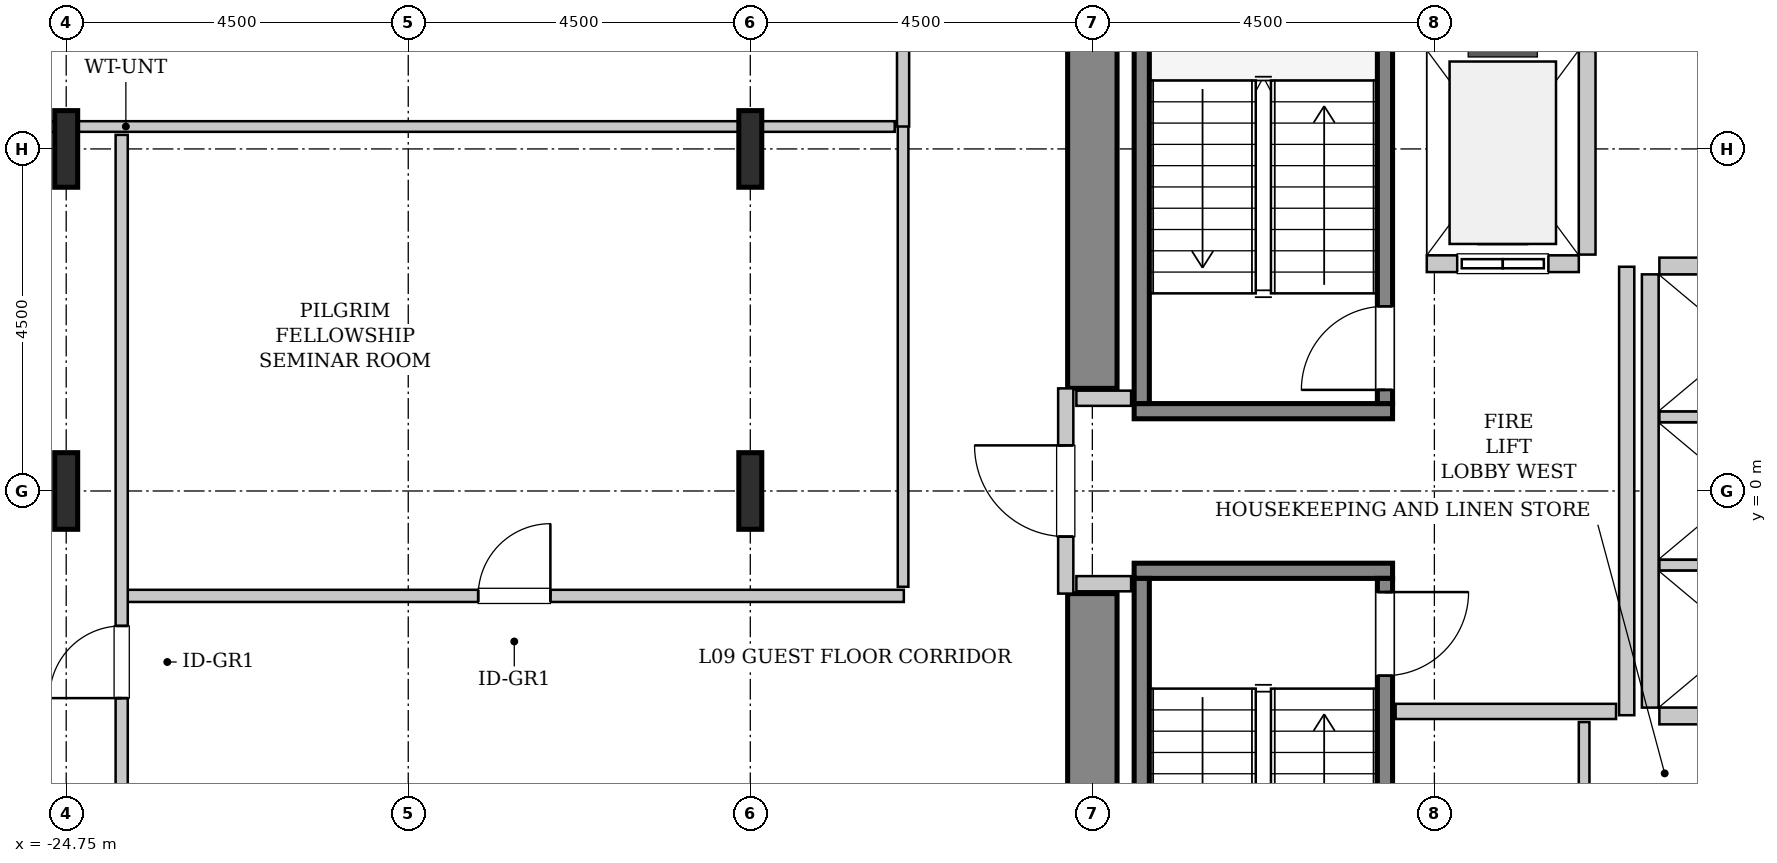
"""IFC4 building model, lengths in metres.
Left out: names, types, materials, properties, quantities, classifications, styles, units other than length and angle.
Written with IfcOpenShell. Run it as: python <this file> out.ifc"""

import sys

from ifc_helpers import new_model, si_unit, direction, frame, frame_2d, origin, origin_2d, place, context, subcontext, project, spatial, rectangle, i_section, extrude, source, transform, mapped, element, fill, save


model = new_model("IFC4")
c1 = context("Model", 3, precision=1e-05, world=origin(), true_north=direction((0.0, 1.0)))
c2 = subcontext(c1, "Body", "Model", "MODEL_VIEW")
j1 = project(units=[si_unit("LENGTHUNIT", "METRE"), si_unit("PLANEANGLEUNIT", "RADIAN")], contexts=[c1])
p1 = place(None, origin())
s1 = spatial("IfcSite", under=j1, at=p1, CompositionType="ELEMENT")
p2 = place(p1, origin())
s2 = spatial("IfcBuilding", under=s1, at=p2, CompositionType="ELEMENT")
p3 = place(p2, frame((0.0, 0.0, 44.4)))
s3 = spatial("IfcBuildingStorey", under=s2, at=p3, CompositionType="ELEMENT", Elevation=44.4)
m1 = source(origin(), c2, "Body", "SweptSolid", [
    extrude(rectangle(XDim=7.325, YDim=0.65, at=frame_2d((3.663, 0.0))), origin(), (0.0, 0.0, 1.0), 3.8),
])
for number, where, z_axis, x_axis in (
    (1, (-11.25, -8.675, 0.0), (0.0, 0.0, 1.0), (0.0, 1.0, 0.0)),
    (2, (-11.25, 1.35, 0.0), (0.0, 0.0, 1.0), (0.0, 1.0, 0.0)),
):
    element("IfcWall", number, at=place(p3, frame(where, z_axis=z_axis, x_axis=x_axis)), inside=s3, PredefinedType="SHEAR", context=c2, shape_type="MappedRepresentation", body=[
        mapped(m1, transform((0.0, 0.0, 0.0), x_axis=(1.0, 0.0, 0.0), y_axis=(0.0, 1.0, 0.0), z_axis=(0.0, 0.0, 1.0), scale=1.0)),
    ])
m2 = source(origin(), c2, "Body", "SweptSolid", [
    extrude(i_section(OverallWidth=0.302, OverallDepth=1.008, WebThickness=0.021, FlangeThickness=0.04, FilletRadius=0.03, at=origin_2d()), origin(), (0.0, 0.0, 1.0), 3.8),
])
for number, where, z_axis, x_axis in (
    (3, (-24.75, 0.0, 0.0), (0.0, 0.0, 1.0), (1.0, 0.0, 0.0)),
    (4, (-24.75, 4.5, 0.0), (0.0, 0.0, 1.0), (1.0, 0.0, 0.0)),
    (5, (-15.75, 0.0, 0.0), (0.0, 0.0, 1.0), (1.0, 0.0, 0.0)),
    (6, (-15.75, 4.5, 0.0), (0.0, 0.0, 1.0), (1.0, 0.0, 0.0)),
):
    element("IfcColumn", number, at=place(p3, frame(where, z_axis=z_axis, x_axis=x_axis)), inside=s3, PredefinedType="COLUMN", context=c2, shape_type="MappedRepresentation", body=[
        mapped(m2, transform((0.0, 0.0, 0.0), x_axis=(1.0, 0.0, 0.0), y_axis=(0.0, 1.0, 0.0), z_axis=(0.0, 0.0, 1.0), scale=1.0)),
    ])
m3 = source(origin(), c2, "Body", "SweptSolid", [
    extrude(rectangle(XDim=3.4, YDim=0.2, at=frame_2d((1.7, 0.0))), origin(), (0.0, 0.0, 1.0), 3.8),
])
p4 = place(p3, frame((-7.3, 1.05, 0.0), z_axis=(0.0, 0.0, 1.0), x_axis=(-1.0, 0.0, 0.0)))
e7 = element("IfcWall", 7, at=p4, inside=s3, PredefinedType="SOLIDWALL", context=c2, shape_type="MappedRepresentation", body=[
    mapped(m3, transform((0.0, 0.0, 0.0), x_axis=(1.0, 0.0, 0.0), y_axis=(0.0, 1.0, 0.0), z_axis=(0.0, 0.0, 1.0), scale=1.0)),
])
m4 = source(origin(), c2, "Body", "SweptSolid", [
    extrude(rectangle(XDim=7.1, YDim=0.2, at=frame_2d((3.55, 0.0))), origin(), (0.0, 0.0, 1.0), 3.8),
])
p5 = place(p3, frame((-7.4, 1.15, 0.0), z_axis=(0.0, 0.0, 1.0), x_axis=(0.0, 1.0, 0.0)))
e8 = element("IfcWall", 8, at=p5, inside=s3, PredefinedType="SOLIDWALL", context=c2, shape_type="MappedRepresentation", body=[
    mapped(m4, transform((0.0, 0.0, 0.0), x_axis=(1.0, 0.0, 0.0), y_axis=(0.0, 1.0, 0.0), z_axis=(0.0, 0.0, 1.0), scale=1.0)),
])
p6 = place(p5, frame((0.18, 0.0, 0.0)))
e9 = element("IfcOpeningElement", 9, at=p6, cuts=e8, PredefinedType="OPENING", context=c2, shape_type="SweptSolid", body=[
    extrude(rectangle(XDim=1.1, YDim=2.15, at=frame_2d((0.55, 1.075))), frame((0.0, 0.11, 0.0), z_axis=(0.0, -1.0, 0.0), x_axis=(1.0, 0.0, 0.0)), (0.0, 0.0, 1.0), 0.22),
])
p7 = place(p3, frame((-10.6, 1.15, 0.0), z_axis=(0.0, 0.0, 1.0), x_axis=(0.0, 1.0, 0.0)))
e10 = element("IfcWall", 10, at=p7, inside=s3, PredefinedType="SOLIDWALL", context=c2, shape_type="MappedRepresentation", body=[
    mapped(m4, transform((0.0, 0.0, 0.0), x_axis=(1.0, 0.0, 0.0), y_axis=(0.0, 1.0, 0.0), z_axis=(0.0, 0.0, 1.0), scale=1.0)),
])
p8 = place(p3, frame((-10.7, -1.05, 0.0), z_axis=(0.0, 0.0, 1.0), x_axis=(1.0, 0.0, 0.0)))
e11 = element("IfcWall", 11, at=p8, inside=s3, PredefinedType="SOLIDWALL", context=c2, shape_type="MappedRepresentation", body=[
    mapped(m3, transform((0.0, 0.0, 0.0), x_axis=(1.0, 0.0, 0.0), y_axis=(0.0, 1.0, 0.0), z_axis=(0.0, 0.0, 1.0), scale=1.0)),
])
p9 = place(p3, frame((-10.6, -1.15, 0.0), z_axis=(0.0, 0.0, 1.0), x_axis=(0.0, -1.0, 0.0)))
e12 = element("IfcWall", 12, at=p9, inside=s3, PredefinedType="SOLIDWALL", context=c2, shape_type="MappedRepresentation", body=[
    mapped(m4, transform((0.0, 0.0, 0.0), x_axis=(1.0, 0.0, 0.0), y_axis=(0.0, 1.0, 0.0), z_axis=(0.0, 0.0, 1.0), scale=1.0)),
])
p10 = place(p3, frame((-7.4, -1.15, 0.0), z_axis=(0.0, 0.0, 1.0), x_axis=(0.0, -1.0, 0.0)))
e13 = element("IfcWall", 13, at=p10, inside=s3, PredefinedType="SOLIDWALL", context=c2, shape_type="MappedRepresentation", body=[
    mapped(m4, transform((0.0, 0.0, 0.0), x_axis=(1.0, 0.0, 0.0), y_axis=(0.0, 1.0, 0.0), z_axis=(0.0, 0.0, 1.0), scale=1.0)),
])
p11 = place(p10, frame((0.18, 0.0, 0.0)))
e14 = element("IfcOpeningElement", 14, at=p11, cuts=e13, PredefinedType="OPENING", context=c2, shape_type="SweptSolid", body=[
    extrude(rectangle(XDim=1.1, YDim=2.15, at=frame_2d((0.55, 1.075))), frame((0.0, 0.11, 0.0), z_axis=(0.0, -1.0, 0.0), x_axis=(1.0, 0.0, 0.0)), (0.0, 0.0, 1.0), 0.22),
])
m5 = source(origin(), c2, "Body", "SweptSolid", [
    extrude(rectangle(XDim=2.0, YDim=0.22, at=frame_2d((1.0, 0.0))), origin(), (0.0, 0.0, 1.0), 3.535),
])
p12 = place(p3, frame((-6.85, 2.99, 0.0), z_axis=(0.0, 0.0, 1.0), x_axis=(1.0, 0.0, 0.0)))
e15 = element("IfcWall", 15, at=p12, inside=s3, PredefinedType="SOLIDWALL", context=c2, shape_type="MappedRepresentation", body=[
    mapped(m5, transform((0.0, 0.0, 0.0), x_axis=(1.0, 0.0, 0.0), y_axis=(0.0, 1.0, 0.0), z_axis=(0.0, 0.0, 1.0), scale=1.0)),
])
p13 = place(p12, frame((0.4, 0.0, 0.0)))
e16 = element("IfcOpeningElement", 16, at=p13, cuts=e15, PredefinedType="OPENING", context=c2, shape_type="SweptSolid", body=[
    extrude(rectangle(XDim=1.2, YDim=2.2, at=frame_2d((0.6, 1.1))), frame((0.0, 0.12, 0.0), z_axis=(0.0, -1.0, 0.0), x_axis=(1.0, 0.0, 0.0)), (0.0, 0.0, 1.0), 0.24),
])
m6 = source(origin(), c2, "Body", "SweptSolid", [
    extrude(rectangle(XDim=2.68, YDim=0.22, at=frame_2d((1.34, 0.0))), origin(), (0.0, 0.0, 1.0), 3.535),
])
p14 = place(p3, frame((-4.74, 3.11, 0.0), z_axis=(0.0, 0.0, 1.0), x_axis=(0.0, 1.0, 0.0)))
e17 = element("IfcWall", 17, at=p14, inside=s3, PredefinedType="SOLIDWALL", context=c2, shape_type="MappedRepresentation", body=[
    mapped(m6, transform((0.0, 0.0, 0.0), x_axis=(1.0, 0.0, 0.0), y_axis=(0.0, 1.0, 0.0), z_axis=(0.0, 0.0, 1.0), scale=1.0)),
])
m7 = source(origin(), c2, "Body", "SweptSolid", [
    extrude(rectangle(XDim=5.7, YDim=0.22, at=frame_2d((2.85, 0.0))), origin(), (0.0, 0.0, 1.0), 3.535),
])
p15 = place(p3, frame((-3.91, 2.85, 0.0), z_axis=(0.0, 0.0, 1.0), x_axis=(0.0, -1.0, 0.0)))
e18 = element("IfcWall", 18, at=p15, inside=s3, PredefinedType="SOLIDWALL", context=c2, shape_type="MappedRepresentation", body=[
    mapped(m7, transform((0.0, 0.0, 0.0), x_axis=(1.0, 0.0, 0.0), y_axis=(0.0, 1.0, 0.0), z_axis=(0.0, 0.0, 1.0), scale=1.0)),
])
m8 = source(origin(), c2, "Body", "SweptSolid", [
    extrude(rectangle(XDim=2.13, YDim=0.22, at=frame_2d((1.065, 0.0))), origin(), (0.0, 0.0, 1.0), 3.535),
])
p16 = place(p3, frame((-3.79, -2.96, 0.0), z_axis=(0.0, 0.0, 1.0), x_axis=(1.0, 0.0, 0.0)))
e19 = element("IfcWall", 19, at=p16, inside=s3, PredefinedType="SOLIDWALL", context=c2, shape_type="MappedRepresentation", body=[
    mapped(m8, transform((0.0, 0.0, 0.0), x_axis=(1.0, 0.0, 0.0), y_axis=(0.0, 1.0, 0.0), z_axis=(0.0, 0.0, 1.0), scale=1.0)),
])
m9 = source(origin(), c2, "Body", "SweptSolid", [
    extrude(rectangle(XDim=2.13, YDim=0.14, at=frame_2d((1.065, 0.0))), origin(), (0.0, 0.0, 1.0), 3.535),
])
for number, where, z_axis, x_axis in (
    (20, (-3.79, -0.975, 0.0), (0.0, 0.0, 1.0), (1.0, 0.0, 0.0)),
    (21, (-3.79, 0.975, 0.0), (0.0, 0.0, 1.0), (1.0, 0.0, 0.0)),
):
    element("IfcWall", number, at=place(p3, frame(where, z_axis=z_axis, x_axis=x_axis)), inside=s3, PredefinedType="PARTITIONING", context=c2, shape_type="MappedRepresentation", body=[
        mapped(m9, transform((0.0, 0.0, 0.0), x_axis=(1.0, 0.0, 0.0), y_axis=(0.0, 1.0, 0.0), z_axis=(0.0, 0.0, 1.0), scale=1.0)),
    ])
p17 = place(p3, frame((-1.66, 2.96, 0.0), z_axis=(0.0, 0.0, 1.0), x_axis=(-1.0, 0.0, 0.0)))
e22 = element("IfcWall", 22, at=p17, inside=s3, PredefinedType="SOLIDWALL", context=c2, shape_type="MappedRepresentation", body=[
    mapped(m8, transform((0.0, 0.0, 0.0), x_axis=(1.0, 0.0, 0.0), y_axis=(0.0, 1.0, 0.0), z_axis=(0.0, 0.0, 1.0), scale=1.0)),
])
m10 = source(origin(), c2, "Body", "SweptSolid", [
    extrude(rectangle(XDim=2.7, YDim=0.2, at=frame_2d((1.35, 0.0))), origin(), (0.0, 0.0, 1.0), 2.425),
])
p18 = place(p3, frame((-11.6, -1.35, 0.0), z_axis=(0.0, 0.0, 1.0), x_axis=(0.0, 1.0, 0.0)))
e23 = element("IfcWall", 23, at=p18, inside=s3, PredefinedType="PARTITIONING", context=c2, shape_type="MappedRepresentation", body=[
    mapped(m10, transform((0.0, 0.0, 0.0), x_axis=(1.0, 0.0, 0.0), y_axis=(0.0, 1.0, 0.0), z_axis=(0.0, 0.0, 1.0), scale=1.0)),
])
p19 = place(p18, frame((0.75, 0.0, 0.0)))
e24 = element("IfcOpeningElement", 24, at=p19, cuts=e23, PredefinedType="OPENING", context=c2, shape_type="SweptSolid", body=[
    extrude(rectangle(XDim=1.2, YDim=2.15, at=frame_2d((0.6, 1.075))), frame((0.0, 0.11, 0.0), z_axis=(0.0, -1.0, 0.0), x_axis=(1.0, 0.0, 0.0)), (0.0, 0.0, 1.0), 0.22),
])
m11 = source(origin(), c2, "Body", "SweptSolid", [
    extrude(rectangle(XDim=5.9, YDim=0.2, at=frame_2d((2.95, 0.0))), origin(), (0.0, 0.0, 1.0), 3.535),
])
p20 = place(p3, frame((-4.22, -2.95, 0.0), z_axis=(0.0, 0.0, 1.0), x_axis=(0.0, 1.0, 0.0)))
e25 = element("IfcWall", 25, at=p20, inside=s3, PredefinedType="PARTITIONING", context=c2, shape_type="MappedRepresentation", body=[
    mapped(m11, transform((0.0, 0.0, 0.0), x_axis=(1.0, 0.0, 0.0), y_axis=(0.0, 1.0, 0.0), z_axis=(0.0, 0.0, 1.0), scale=1.0)),
])
m12 = source(origin(), c2, "Body", "SweptSolid", [
    extrude(rectangle(XDim=2.9, YDim=0.2, at=frame_2d((1.45, 0.0))), origin(), (0.0, 0.0, 1.0), 3.535),
])
p21 = place(p3, frame((-7.26, -2.9, 0.0), z_axis=(0.0, 0.0, 1.0), x_axis=(1.0, 0.0, 0.0)))
e26 = element("IfcWall", 26, at=p21, inside=s3, PredefinedType="PARTITIONING", context=c2, shape_type="MappedRepresentation", body=[
    mapped(m12, transform((0.0, 0.0, 0.0), x_axis=(1.0, 0.0, 0.0), y_axis=(0.0, 1.0, 0.0), z_axis=(0.0, 0.0, 1.0), scale=1.0)),
])
m13 = source(origin(), c2, "Body", "SweptSolid", [
    extrude(rectangle(XDim=0.72, YDim=0.2, at=frame_2d((0.36, 0.0))), origin(), (0.0, 0.0, 1.0), 3.535),
])
for number, where, z_axis, x_axis in (
    (27, (-11.46, 1.22, 0.0), (0.0, 0.0, 1.0), (1.0, 0.0, 0.0)),
    (28, (-11.46, -1.22, 0.0), (0.0, 0.0, 1.0), (1.0, 0.0, 0.0)),
):
    element("IfcWall", number, at=place(p3, frame(where, z_axis=z_axis, x_axis=x_axis)), inside=s3, PredefinedType="PARTITIONING", context=c2, shape_type="MappedRepresentation", body=[
        mapped(m13, transform((0.0, 0.0, 0.0), x_axis=(1.0, 0.0, 0.0), y_axis=(0.0, 1.0, 0.0), z_axis=(0.0, 0.0, 1.0), scale=1.0)),
    ])
m14 = source(origin(), c2, "Body", "SweptSolid", [
    extrude(rectangle(XDim=1.26, YDim=0.14, at=frame_2d((0.63, 0.0))), origin(), (0.0, 0.0, 1.0), 3.535),
])
p22 = place(p3, frame((-4.78, -4.3, 0.0), z_axis=(0.0, 0.0, 1.0), x_axis=(0.0, 1.0, 0.0)))
e29 = element("IfcWall", 29, at=p22, inside=s3, PredefinedType="PARTITIONING", context=c2, shape_type="MappedRepresentation", body=[
    mapped(m14, transform((0.0, 0.0, 0.0), x_axis=(1.0, 0.0, 0.0), y_axis=(0.0, 1.0, 0.0), z_axis=(0.0, 0.0, 1.0), scale=1.0)),
])
m15 = source(origin(), c2, "Body", "SweptSolid", [
    extrude(rectangle(XDim=10.25, YDim=0.16, at=frame_2d((5.125, 0.0))), origin(), (0.0, 0.0, 1.0), 3.535),
])
p23 = place(p3, frame((-23.98, -1.38, 0.0), z_axis=(0.0, 0.0, 1.0), x_axis=(1.0, 0.0, 0.0)))
e30 = element("IfcWall", 30, at=p23, inside=s3, PredefinedType="PARTITIONING", context=c2, shape_type="MappedRepresentation", body=[
    mapped(m15, transform((0.0, 0.0, 0.0), x_axis=(1.0, 0.0, 0.0), y_axis=(0.0, 1.0, 0.0), z_axis=(0.0, 0.0, 1.0), scale=1.0)),
])
p24 = place(p23, frame((4.65, 0.0, 0.0)))
e31 = element("IfcOpeningElement", 31, at=p24, cuts=e30, PredefinedType="OPENING", context=c2, shape_type="SweptSolid", body=[
    extrude(rectangle(XDim=0.95, YDim=2.1, at=frame_2d((0.475, 1.05))), frame((0.0, 0.09, 0.0), z_axis=(0.0, -1.0, 0.0), x_axis=(1.0, 0.0, 0.0)), (0.0, 0.0, 1.0), 0.18),
])
m16 = source(origin(), c2, "Body", "SweptSolid", [
    extrude(rectangle(XDim=6.065, YDim=0.14, at=frame_2d((3.032, 0.0))), origin(), (0.0, 0.0, 1.0), 3.535),
])
p25 = place(p3, frame((-13.74, -1.26, 0.0), z_axis=(0.0, 0.0, 1.0), x_axis=(0.0, 1.0, 0.0)))
e32 = element("IfcWall", 32, at=p25, inside=s3, PredefinedType="PARTITIONING", context=c2, shape_type="MappedRepresentation", body=[
    mapped(m16, transform((0.0, 0.0, 0.0), x_axis=(1.0, 0.0, 0.0), y_axis=(0.0, 1.0, 0.0), z_axis=(0.0, 0.0, 1.0), scale=1.0)),
])
m17 = source(origin(), c2, "Body", "SweptSolid", [
    extrude(rectangle(XDim=20.23, YDim=0.14, at=frame_2d((10.115, 0.0))), origin(), (0.0, 0.0, 1.0), 2.825),
])
p26 = place(p3, frame((-34.08, 4.795, 0.0), z_axis=(0.0, 0.0, 1.0), x_axis=(1.0, 0.0, 0.0)))
e33 = element("IfcWall", 33, at=p26, inside=s3, PredefinedType="PARTITIONING", context=c2, shape_type="MappedRepresentation", body=[
    mapped(m17, transform((0.0, 0.0, 0.0), x_axis=(1.0, 0.0, 0.0), y_axis=(0.0, 1.0, 0.0), z_axis=(0.0, 0.0, 1.0), scale=1.0)),
])
m18 = source(origin(), c2, "Body", "SweptSolid", [
    extrude(rectangle(XDim=9.68, YDim=0.16, at=frame_2d((4.84, 0.0))), origin(), (0.0, 0.0, 1.0), 3.535),
])
p27 = place(p3, frame((-24.02, -4.995, 0.0), z_axis=(0.0, 0.0, 1.0), x_axis=(0.0, 1.0, 0.0)))
e34 = element("IfcWall", 34, at=p27, inside=s3, PredefinedType="PARTITIONING", context=c2, shape_type="MappedRepresentation", body=[
    mapped(m18, transform((0.0, 0.0, 0.0), x_axis=(1.0, 0.0, 0.0), y_axis=(0.0, 1.0, 0.0), z_axis=(0.0, 0.0, 1.0), scale=1.0)),
])
p28 = place(p27, frame((2.27, 0.0, 0.0)))
e35 = element("IfcOpeningElement", 35, at=p28, cuts=e34, PredefinedType="OPENING", context=c2, shape_type="SweptSolid", body=[
    extrude(rectangle(XDim=0.95, YDim=2.1, at=frame_2d((0.475, 1.05))), frame((0.0, 0.09, 0.0), z_axis=(0.0, -1.0, 0.0), x_axis=(1.0, 0.0, 0.0)), (0.0, 0.0, 1.0), 0.18),
])
m19 = source(origin(), c2, "Body", "SweptSolid", [
    extrude(rectangle(XDim=3.61, YDim=0.16, at=frame_2d((1.805, 0.0))), origin(), (0.0, 0.0, 1.0), 3.535),
])
p29 = place(p3, frame((-13.74, 4.795, 0.0), z_axis=(0.0, 0.0, 1.0), x_axis=(0.0, 1.0, 0.0)))
e36 = element("IfcWall", 36, at=p29, inside=s3, PredefinedType="PARTITIONING", context=c2, shape_type="MappedRepresentation", body=[
    mapped(m19, transform((0.0, 0.0, 0.0), x_axis=(1.0, 0.0, 0.0), y_axis=(0.0, 1.0, 0.0), z_axis=(0.0, 0.0, 1.0), scale=1.0)),
])
p30 = place(p29, frame((1.33, 0.0, 0.0)))
e37 = element("IfcOpeningElement", 37, at=p30, cuts=e36, PredefinedType="OPENING", context=c2, shape_type="SweptSolid", body=[
    extrude(rectangle(XDim=0.95, YDim=2.1, at=frame_2d((0.475, 1.05))), frame((0.0, 0.09, 0.0), z_axis=(0.0, -1.0, 0.0), x_axis=(1.0, 0.0, 0.0)), (0.0, 0.0, 1.0), 0.18),
])
m20 = source(origin(), c2, "Body", "SweptSolid", [
    extrude(rectangle(XDim=1.1, YDim=2.15, at=frame_2d((0.55, 1.075))), frame((0.0, 0.025, 0.0), z_axis=(0.0, -1.0, 0.0), x_axis=(1.0, 0.0, 0.0)), (0.0, 0.0, 1.0), 0.05),
])
p31 = place(p6, origin())
e38 = element("IfcDoor", 38, at=p31, inside=s3, OperationType="SINGLE_SWING_LEFT", PredefinedType="DOOR", context=c2, shape_type="MappedRepresentation", body=[
    mapped(m20, transform((0.0, 0.0, 0.0), x_axis=(1.0, 0.0, 0.0), y_axis=(0.0, 1.0, 0.0), z_axis=(0.0, 0.0, 1.0), scale=1.0)),
])
fill(e9, e38)
p32 = place(p11, origin())
e39 = element("IfcDoor", 39, at=p32, inside=s3, OperationType="SINGLE_SWING_LEFT", PredefinedType="DOOR", context=c2, shape_type="MappedRepresentation", body=[
    mapped(m20, transform((0.0, 0.0, 0.0), x_axis=(1.0, 0.0, 0.0), y_axis=(0.0, 1.0, 0.0), z_axis=(0.0, 0.0, 1.0), scale=1.0)),
])
fill(e14, e39)
m21 = source(origin(), c2, "Body", "SweptSolid", [
    extrude(rectangle(XDim=1.2, YDim=2.2, at=frame_2d((0.6, 1.1))), frame((0.0, 0.025, 0.0), z_axis=(0.0, -1.0, 0.0), x_axis=(1.0, 0.0, 0.0)), (0.0, 0.0, 1.0), 0.05),
])
p33 = place(p13, origin())
e40 = element("IfcDoor", 40, at=p33, inside=s3, OperationType="SLIDING_TO_LEFT", PredefinedType="DOOR", context=c2, shape_type="MappedRepresentation", body=[
    mapped(m21, transform((0.0, 0.0, 0.0), x_axis=(1.0, 0.0, 0.0), y_axis=(0.0, 1.0, 0.0), z_axis=(0.0, 0.0, 1.0), scale=1.0)),
])
fill(e16, e40)
m22 = source(origin(), c2, "Body", "SweptSolid", [
    extrude(rectangle(XDim=1.2, YDim=2.15, at=frame_2d((0.6, 1.075))), frame((0.0, 0.025, 0.0), z_axis=(0.0, -1.0, 0.0), x_axis=(1.0, 0.0, 0.0)), (0.0, 0.0, 1.0), 0.05),
])
p34 = place(p19, origin())
e41 = element("IfcDoor", 41, at=p34, inside=s3, OperationType="SINGLE_SWING_RIGHT", PredefinedType="DOOR", context=c2, shape_type="MappedRepresentation", body=[
    mapped(m22, transform((0.0, 0.0, 0.0), x_axis=(1.0, 0.0, 0.0), y_axis=(0.0, 1.0, 0.0), z_axis=(0.0, 0.0, 1.0), scale=1.0)),
])
fill(e24, e41)
m23 = source(origin(), c2, "Body", "SweptSolid", [
    extrude(rectangle(XDim=0.95, YDim=2.1, at=frame_2d((0.475, 1.05))), frame((0.0, 0.025, 0.0), z_axis=(0.0, -1.0, 0.0), x_axis=(1.0, 0.0, 0.0)), (0.0, 0.0, 1.0), 0.05),
])
p35 = place(p24, origin())
e42 = element("IfcDoor", 42, at=p35, inside=s3, OperationType="SINGLE_SWING_RIGHT", PredefinedType="DOOR", context=c2, shape_type="MappedRepresentation", body=[
    mapped(m23, transform((0.0, 0.0, 0.0), x_axis=(1.0, 0.0, 0.0), y_axis=(0.0, 1.0, 0.0), z_axis=(0.0, 0.0, 1.0), scale=1.0)),
])
fill(e31, e42)
p36 = place(p28, origin())
e43 = element("IfcDoor", 43, at=p36, inside=s3, OperationType="SINGLE_SWING_LEFT", PredefinedType="DOOR", context=c2, shape_type="MappedRepresentation", body=[
    mapped(m23, transform((0.0, 0.0, 0.0), x_axis=(1.0, 0.0, 0.0), y_axis=(0.0, 1.0, 0.0), z_axis=(0.0, 0.0, 1.0), scale=1.0)),
])
fill(e35, e43)
save(model, sys.argv[1])
